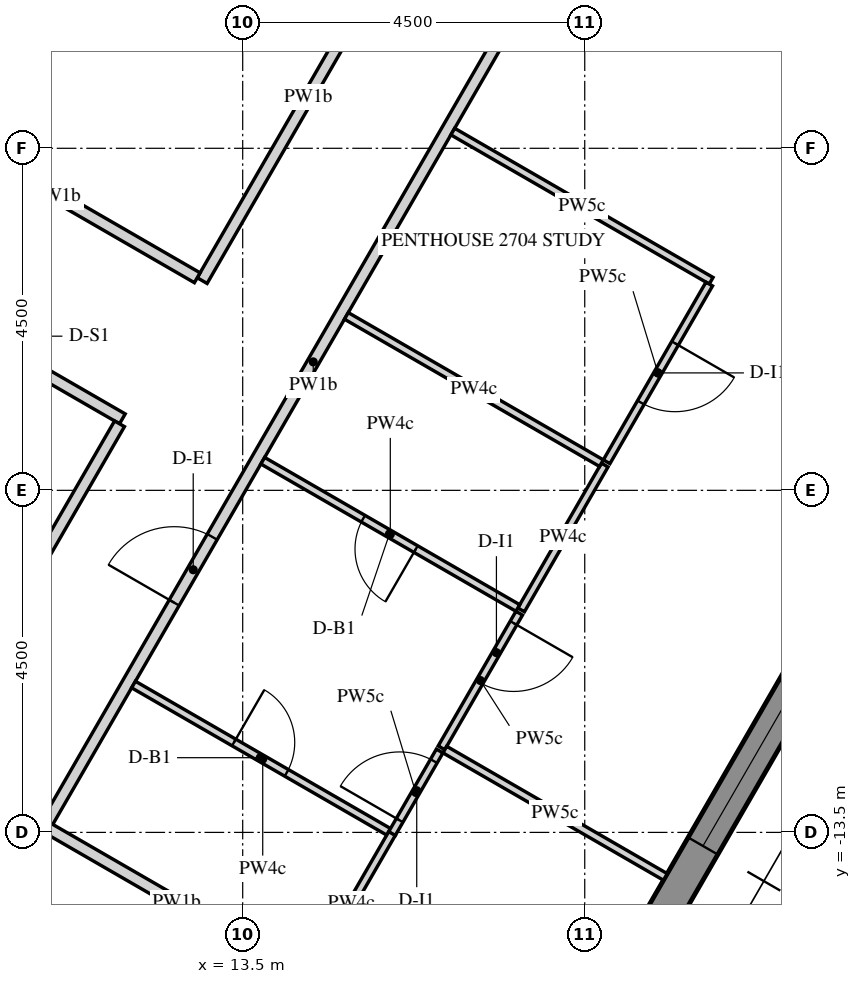
"""IFC4 building model, lengths in metres.
Left out: names, types, materials, properties, quantities, classifications, styles, units other than length and angle.
Written with IfcOpenShell. Run it as: python <this file> out.ifc"""

import sys

from ifc_helpers import new_model, si_unit, direction, frame, frame_2d, origin, place, context, subcontext, project, spatial, polyline, rectangle, outline, extrude, element, fill, save


model = new_model("IFC4")
c1 = context("Model", 3, precision=1e-05, world=origin(), true_north=direction((0.0, 1.0)))
c2 = subcontext(c1, "Body", "Model", "MODEL_VIEW")
j1 = project(units=[si_unit("LENGTHUNIT", "METRE"), si_unit("PLANEANGLEUNIT", "RADIAN")], contexts=[c1])
p1 = place(None, origin())
s1 = spatial("IfcSite", under=j1, at=p1, CompositionType="ELEMENT")
p2 = place(p1, origin())
s2 = spatial("IfcBuilding", under=s1, at=p2, CompositionType="ELEMENT")
p3 = place(p2, frame((0.0, 0.0, 353.4)))
s3 = spatial("IfcBuildingStorey", under=s2, at=p3, CompositionType="ELEMENT", Elevation=353.4)
p4 = place(p3, frame((15.273, -21.097, -0.15), z_axis=(0.0, 0.0, 1.0), x_axis=(0.499997453958, 0.866026873738, 0.0)))
e1 = element("IfcWall", 1, at=p4, inside=s3, PredefinedType="SOLIDWALL", context=c2, shape_type="SweptSolid", body=[
    extrude(outline(polyline([(-0.018, -0.225), (23.152, -0.225), (23.11, 0.225), (0.018, 0.225), (-0.018, -0.225)])), origin(), (0.0, 0.0, 1.0), 3.9),
])
p5 = place(p4, frame((1.366, 0.0, 0.45)))
e2 = element("IfcOpeningElement", 2, at=p5, cuts=e1, PredefinedType="OPENING", context=c2, shape_type="SweptSolid", body=[
    extrude(rectangle(XDim=2.4, YDim=3.0, at=frame_2d((1.2, 1.5))), frame((0.0, 0.235, 0.0), z_axis=(0.0, -1.0, 0.0), x_axis=(1.0, 0.0, 0.0)), (0.0, 0.0, 1.0), 0.47),
])
p6 = place(p4, frame((4.966, 0.0, 0.45)))
e3 = element("IfcOpeningElement", 3, at=p6, cuts=e1, PredefinedType="OPENING", context=c2, shape_type="SweptSolid", body=[
    extrude(rectangle(XDim=2.4, YDim=3.0, at=frame_2d((1.2, 1.5))), frame((0.0, 0.235, 0.0), z_axis=(0.0, -1.0, 0.0), x_axis=(1.0, 0.0, 0.0)), (0.0, 0.0, 1.0), 0.47),
])
p7 = place(p4, frame((8.566, 0.0, 0.45)))
e4 = element("IfcOpeningElement", 4, at=p7, cuts=e1, PredefinedType="OPENING", context=c2, shape_type="SweptSolid", body=[
    extrude(rectangle(XDim=2.4, YDim=3.0, at=frame_2d((1.2, 1.5))), frame((0.0, 0.235, 0.0), z_axis=(0.0, -1.0, 0.0), x_axis=(1.0, 0.0, 0.0)), (0.0, 0.0, 1.0), 0.47),
])
p8 = place(p4, frame((12.166, 0.0, 0.45)))
e5 = element("IfcOpeningElement", 5, at=p8, cuts=e1, PredefinedType="OPENING", context=c2, shape_type="SweptSolid", body=[
    extrude(rectangle(XDim=2.4, YDim=3.0, at=frame_2d((1.2, 1.5))), frame((0.0, 0.235, 0.0), z_axis=(0.0, -1.0, 0.0), x_axis=(1.0, 0.0, 0.0)), (0.0, 0.0, 1.0), 0.47),
])
p9 = place(p4, frame((15.766, 0.0, 0.45)))
e6 = element("IfcOpeningElement", 6, at=p9, cuts=e1, PredefinedType="OPENING", context=c2, shape_type="SweptSolid", body=[
    extrude(rectangle(XDim=2.4, YDim=3.0, at=frame_2d((1.2, 1.5))), frame((0.0, 0.235, 0.0), z_axis=(0.0, -1.0, 0.0), x_axis=(1.0, 0.0, 0.0)), (0.0, 0.0, 1.0), 0.47),
])
p10 = place(p4, frame((19.366, 0.0, 0.45)))
e7 = element("IfcOpeningElement", 7, at=p10, cuts=e1, PredefinedType="OPENING", context=c2, shape_type="SweptSolid", body=[
    extrude(rectangle(XDim=2.4, YDim=3.0, at=frame_2d((1.2, 1.5))), frame((0.0, 0.235, 0.0), z_axis=(0.0, -1.0, 0.0), x_axis=(1.0, 0.0, 0.0)), (0.0, 0.0, 1.0), 0.47),
])
p11 = place(p3, frame((5.673, -9.825, -0.15), z_axis=(0.0, 0.0, 1.0), x_axis=(0.499995046907, 0.866028263435, 0.0)))
e8 = element("IfcWall", 8, at=p11, inside=s3, PredefinedType="SHEAR", context=c2, shape_type="SweptSolid", body=[
    extrude(outline(polyline([(-0.101, -0.175), (11.446, -0.175), (11.244, 0.175), (0.101, 0.175), (-0.101, -0.175)])), origin(), (0.0, 0.0, 1.0), 3.9),
])
p12 = place(p11, frame((4.801, 0.0, 0.15)))
e9 = element("IfcOpeningElement", 9, at=p12, cuts=e8, PredefinedType="OPENING", context=c2, shape_type="SweptSolid", body=[
    extrude(rectangle(XDim=1.8, YDim=2.4, at=frame_2d((0.9, 1.2))), frame((0.0, 0.185, 0.0), z_axis=(0.0, -1.0, 0.0), x_axis=(1.0, 0.0, 0.0)), (0.0, 0.0, 1.0), 0.37),
])
p13 = place(p3, frame((5.773, -10.0, -0.15), z_axis=(0.0, 0.0, 1.0), x_axis=(0.500007911273, -0.866020836161, 0.0)))
e10 = element("IfcWall", 10, at=p13, inside=s3, PredefinedType="SHEAR", context=c2, shape_type="SweptSolid", body=[
    extrude(rectangle(XDim=14.51, YDim=0.35, at=frame_2d((7.255, 0.0))), origin(), (0.0, 0.0, 1.0), 3.9),
])
p14 = place(p13, frame((6.355, 0.0, 0.15)))
e11 = element("IfcOpeningElement", 11, at=p14, cuts=e10, PredefinedType="OPENING", context=c2, shape_type="SweptSolid", body=[
    extrude(rectangle(XDim=1.8, YDim=2.4, at=frame_2d((0.9, 1.2))), frame((0.0, 0.185, 0.0), z_axis=(0.0, -1.0, 0.0), x_axis=(1.0, 0.0, 0.0)), (0.0, 0.0, 1.0), 0.37),
])
p15 = place(p3, frame((10.937, -13.357, 0.0), z_axis=(0.0, 0.0, 1.0), x_axis=(0.499993317597, 0.866029261837, 0.0)))
e12 = element("IfcWall", 12, at=p15, inside=s3, PredefinedType="PARTITIONING", context=c2, shape_type="SweptSolid", body=[
    extrude(rectangle(XDim=13.966, YDim=0.15, at=frame_2d((6.983, 0.0))), origin(), (0.0, 0.0, 1.0), 2.82),
])
p16 = place(p15, frame((3.325, 0.0, 0.0)))
e13 = element("IfcOpeningElement", 13, at=p16, cuts=e12, PredefinedType="OPENING", context=c2, shape_type="SweptSolid", body=[
    extrude(rectangle(XDim=1.0, YDim=2.1, at=frame_2d((0.5, 1.05))), frame((0.0, 0.085, 0.0), z_axis=(0.0, -1.0, 0.0), x_axis=(1.0, 0.0, 0.0)), (0.0, 0.0, 1.0), 0.17),
])
p17 = place(p3, frame((14.363, -15.422, 0.0), z_axis=(0.0, 0.0, 1.0), x_axis=(-0.866026010844, 0.49999894854, 0.0)))
e14 = element("IfcWall", 14, at=p17, inside=s3, PredefinedType="PARTITIONING", context=c2, shape_type="SweptSolid", body=[
    extrude(rectangle(XDim=4.0, YDim=0.15, at=frame_2d((2.0, 0.0))), origin(), (0.0, 0.0, 1.0), 2.82),
])
p18 = place(p3, frame((15.757, -1.409, 0.0), z_axis=(0.0, 0.0, 1.0), x_axis=(-0.500002739321, -0.866023822231, 0.0)))
e15 = element("IfcWall", 15, at=p18, inside=s3, PredefinedType="PARTITIONING", context=c2, shape_type="SweptSolid", body=[
    extrude(rectangle(XDim=5.58, YDim=0.15, at=frame_2d((2.79, 0.0))), origin(), (0.0, 0.0, 1.0), 2.82),
])
p19 = place(p3, frame((12.902, -6.203, 0.0), z_axis=(0.0, 0.0, 1.0), x_axis=(-0.866023907196, 0.500002592159, 0.0)))
e16 = element("IfcWall", 16, at=p19, inside=s3, PredefinedType="PARTITIONING", context=c2, shape_type="SweptSolid", body=[
    extrude(rectangle(XDim=4.275, YDim=0.15, at=frame_2d((2.137, 0.0))), origin(), (0.0, 0.0, 1.0), 2.82),
])
p20 = place(p3, frame((8.15, -5.884, 0.0), z_axis=(0.0, 0.0, 1.0), x_axis=(0.866027639635, -0.499996127374, 0.0)))
e17 = element("IfcWall", 17, at=p20, inside=s3, PredefinedType="PARTITIONING", context=c2, shape_type="SweptSolid", body=[
    extrude(rectangle(XDim=4.35, YDim=0.15, at=frame_2d((2.175, 0.0))), origin(), (0.0, 0.0, 1.0), 2.82),
])
p21 = place(p20, frame((1.725, 0.0, 0.0)))
e18 = element("IfcOpeningElement", 18, at=p21, cuts=e17, PredefinedType="OPENING", context=c2, shape_type="SweptSolid", body=[
    extrude(rectangle(XDim=0.9, YDim=2.1, at=frame_2d((0.45, 1.05))), frame((0.0, 0.085, 0.0), z_axis=(0.0, -1.0, 0.0), x_axis=(1.0, 0.0, 0.0)), (0.0, 0.0, 1.0), 0.17),
])
p22 = place(p3, frame((11.879, -8.124, 0.0), z_axis=(0.0, 0.0, 1.0), x_axis=(-0.500006178143, -0.866021836803, 0.0)))
e19 = element("IfcWall", 19, at=p22, inside=s3, PredefinedType="PARTITIONING", context=c2, shape_type="SweptSolid", body=[
    extrude(rectangle(XDim=4.122, YDim=0.15, at=frame_2d((2.061, 0.0))), origin(), (0.0, 0.0, 1.0), 2.82),
])
p23 = place(p3, frame((17.138, -10.616, 0.0), z_axis=(0.0, 0.0, 1.0), x_axis=(-0.500015134316, -0.866016665807, 0.0)))
e20 = element("IfcWall", 20, at=p23, inside=s3, PredefinedType="PARTITIONING", context=c2, shape_type="SweptSolid", body=[
    extrude(rectangle(XDim=2.046, YDim=0.1, at=frame_2d((1.023, 0.0))), origin(), (0.0, 0.0, 1.0), 2.82),
])
p24 = place(p23, frame((0.15, 0.0, 0.0)))
e21 = element("IfcOpeningElement", 21, at=p24, cuts=e20, PredefinedType="OPENING", context=c2, shape_type="SweptSolid", body=[
    extrude(rectangle(XDim=0.9, YDim=2.1, at=frame_2d((0.45, 1.05))), frame((0.0, 0.06, 0.0), z_axis=(0.0, -1.0, 0.0), x_axis=(1.0, 0.0, 0.0)), (0.0, 0.0, 1.0), 0.12),
])
p25 = place(p3, frame((16.159, -12.411, 0.0), z_axis=(0.0, 0.0, 1.0), x_axis=(0.866032680314, -0.499987396469, 0.0)))
e22 = element("IfcWall", 22, at=p25, inside=s3, PredefinedType="PARTITIONING", context=c2, shape_type="SweptSolid", body=[
    extrude(rectangle(XDim=3.35, YDim=0.1, at=frame_2d((1.675, 0.0))), origin(), (0.0, 0.0, 1.0), 2.82),
])
p26 = place(p3, frame((18.263, -8.667, 0.0), z_axis=(0.0, 0.0, 1.0), x_axis=(-0.50002983664, -0.866008176907, 0.0)))
e23 = element("IfcWall", 23, at=p26, inside=s3, PredefinedType="PARTITIONING", context=c2, shape_type="SweptSolid", body=[
    extrude(rectangle(XDim=2.2, YDim=0.1, at=frame_2d((1.1, 0.0))), origin(), (0.0, 0.0, 1.0), 2.82),
])
p27 = place(p3, frame((16.264, -4.28, 0.0), z_axis=(0.0, 0.0, 1.0), x_axis=(0.866037464623, -0.499979109433, 0.0)))
e24 = element("IfcWall", 24, at=p27, inside=s3, PredefinedType="PARTITIONING", context=c2, shape_type="SweptSolid", body=[
    extrude(rectangle(XDim=3.925, YDim=0.1, at=frame_2d((1.962, 0.0))), origin(), (0.0, 0.0, 1.0), 2.82),
])
p28 = place(p3, frame((19.638, -6.286, 0.0), z_axis=(0.0, 0.0, 1.0), x_axis=(-0.500048589285, -0.86599734893, 0.0)))
e25 = element("IfcWall", 25, at=p28, inside=s3, PredefinedType="PARTITIONING", context=c2, shape_type="SweptSolid", body=[
    extrude(rectangle(XDim=2.7, YDim=0.1, at=frame_2d((1.35, 0.0))), origin(), (0.0, 0.0, 1.0), 2.82),
])
p29 = place(p28, frame((0.9, 0.0, 0.0)))
e26 = element("IfcOpeningElement", 26, at=p29, cuts=e25, PredefinedType="OPENING", context=c2, shape_type="SweptSolid", body=[
    extrude(rectangle(XDim=0.9, YDim=2.1, at=frame_2d((0.45, 1.05))), frame((0.0, 0.06, 0.0), z_axis=(0.0, -1.0, 0.0), x_axis=(1.0, 0.0, 0.0)), (0.0, 0.0, 1.0), 0.12),
])
p30 = place(p3, frame((12.064, -11.555, 0.0), z_axis=(0.0, 0.0, 1.0), x_axis=(0.866037464623, -0.499979109433, 0.0)))
e27 = element("IfcWall", 27, at=p30, inside=s3, PredefinedType="PARTITIONING", context=c2, shape_type="SweptSolid", body=[
    extrude(rectangle(XDim=3.925, YDim=0.1, at=frame_2d((1.962, 0.0))), origin(), (0.0, 0.0, 1.0), 2.82),
])
p31 = place(p30, frame((1.525, 0.0, 0.0)))
e28 = element("IfcOpeningElement", 28, at=p31, cuts=e27, PredefinedType="OPENING", context=c2, shape_type="SweptSolid", body=[
    extrude(rectangle(XDim=0.8, YDim=2.1, at=frame_2d((0.4, 1.05))), frame((0.0, 0.06, 0.0), z_axis=(0.0, -1.0, 0.0), x_axis=(1.0, 0.0, 0.0)), (0.0, 0.0, 1.0), 0.12),
])
p32 = place(p3, frame((15.462, -13.519, 0.0), z_axis=(0.0, 0.0, 1.0), x_axis=(0.50004158446, 0.866001393654, 0.0)))
e29 = element("IfcWall", 29, at=p32, inside=s3, PredefinedType="PARTITIONING", context=c2, shape_type="SweptSolid", body=[
    extrude(rectangle(XDim=1.258, YDim=0.1, at=frame_2d((0.629, 0.0))), origin(), (0.0, 0.0, 1.0), 2.82),
])
p33 = place(p32, frame((0.205, 0.0, 0.0)))
e30 = element("IfcOpeningElement", 30, at=p33, cuts=e29, PredefinedType="OPENING", context=c2, shape_type="SweptSolid", body=[
    extrude(rectangle(XDim=0.9, YDim=2.1, at=frame_2d((0.45, 1.05))), frame((0.0, 0.06, 0.0), z_axis=(0.0, -1.0, 0.0), x_axis=(1.0, 0.0, 0.0)), (0.0, 0.0, 1.0), 0.12),
])
p34 = place(p3, frame((17.12, -10.548, 0.0), z_axis=(0.0, 0.0, 1.0), x_axis=(-0.866032409438, 0.499987865656, 0.0)))
e31 = element("IfcWall", 31, at=p34, inside=s3, PredefinedType="PARTITIONING", context=c2, shape_type="SweptSolid", body=[
    extrude(rectangle(XDim=3.875, YDim=0.1, at=frame_2d((1.938, 0.0))), origin(), (0.0, 0.0, 1.0), 2.82),
])
p35 = place(p34, frame((1.55, 0.0, 0.0)))
e32 = element("IfcOpeningElement", 32, at=p35, cuts=e31, PredefinedType="OPENING", context=c2, shape_type="SweptSolid", body=[
    extrude(rectangle(XDim=0.8, YDim=2.1, at=frame_2d((0.4, 1.05))), frame((0.0, 0.06, 0.0), z_axis=(0.0, -1.0, 0.0), x_axis=(1.0, 0.0, 0.0)), (0.0, 0.0, 1.0), 0.12),
])
p36 = place(p3, frame((14.4, -15.359, 0.0), z_axis=(0.0, 0.0, 1.0), x_axis=(0.499987164874, 0.866032814021, 0.0)))
e33 = element("IfcWall", 33, at=p36, inside=s3, PredefinedType="PARTITIONING", context=c2, shape_type="SweptSolid", body=[
    extrude(rectangle(XDim=2.129, YDim=0.1, at=frame_2d((1.064, 0.0))), origin(), (0.0, 0.0, 1.0), 2.82),
])
p37 = place(p3, frame((18.22, -8.642, 0.0), z_axis=(0.0, 0.0, 1.0), x_axis=(-0.866016658288, 0.500015147339, 0.0)))
e34 = element("IfcWall", 34, at=p37, inside=s3, PredefinedType="PARTITIONING", context=c2, shape_type="SweptSolid", body=[
    extrude(rectangle(XDim=3.875, YDim=0.1, at=frame_2d((1.938, 0.0))), origin(), (0.0, 0.0, 1.0), 2.82),
])
p38 = place(p7, frame((0.0, 0.155, 0.0)))
e35 = element("IfcWindow", 35, at=p38, inside=s3, PartitioningType="DOUBLE_PANEL_VERTICAL", PredefinedType="WINDOW", context=c2, shape_type="SweptSolid", body=[
    extrude(rectangle(XDim=2.4, YDim=3.0, at=frame_2d((1.2, 1.5))), frame((0.0, 0.03, 0.0), z_axis=(0.0, -1.0, 0.0), x_axis=(1.0, 0.0, 0.0)), (0.0, 0.0, 1.0), 0.06),
])
fill(e4, e35)
p39 = place(p16, origin())
e36 = element("IfcDoor", 36, at=p39, inside=s3, OperationType="SINGLE_SWING_LEFT", PredefinedType="DOOR", context=c2, shape_type="SweptSolid", body=[
    extrude(rectangle(XDim=1.0, YDim=2.1, at=frame_2d((0.5, 1.05))), frame((0.0, 0.025, 0.0), z_axis=(0.0, -1.0, 0.0), x_axis=(1.0, 0.0, 0.0)), (0.0, 0.0, 1.0), 0.05),
])
fill(e13, e36)
p40 = place(p31, origin())
e37 = element("IfcDoor", 37, at=p40, inside=s3, OperationType="SINGLE_SWING_RIGHT", PredefinedType="DOOR", context=c2, shape_type="SweptSolid", body=[
    extrude(rectangle(XDim=0.8, YDim=2.1, at=frame_2d((0.4, 1.05))), frame((0.0, 0.025, 0.0), z_axis=(0.0, -1.0, 0.0), x_axis=(1.0, 0.0, 0.0)), (0.0, 0.0, 1.0), 0.05),
])
fill(e28, e37)
p41 = place(p24, origin())
e38 = element("IfcDoor", 38, at=p41, inside=s3, OperationType="SINGLE_SWING_RIGHT", PredefinedType="DOOR", context=c2, shape_type="SweptSolid", body=[
    extrude(rectangle(XDim=0.9, YDim=2.1, at=frame_2d((0.45, 1.05))), frame((0.0, 0.025, 0.0), z_axis=(0.0, -1.0, 0.0), x_axis=(1.0, 0.0, 0.0)), (0.0, 0.0, 1.0), 0.05),
])
fill(e21, e38)
p42 = place(p33, origin())
e39 = element("IfcDoor", 39, at=p42, inside=s3, OperationType="SINGLE_SWING_LEFT", PredefinedType="DOOR", context=c2, shape_type="SweptSolid", body=[
    extrude(rectangle(XDim=0.9, YDim=2.1, at=frame_2d((0.45, 1.05))), frame((0.0, 0.025, 0.0), z_axis=(0.0, -1.0, 0.0), x_axis=(1.0, 0.0, 0.0)), (0.0, 0.0, 1.0), 0.05),
])
fill(e30, e39)
p43 = place(p35, origin())
e40 = element("IfcDoor", 40, at=p43, inside=s3, OperationType="SINGLE_SWING_LEFT", PredefinedType="DOOR", context=c2, shape_type="SweptSolid", body=[
    extrude(rectangle(XDim=0.8, YDim=2.1, at=frame_2d((0.4, 1.05))), frame((0.0, 0.025, 0.0), z_axis=(0.0, -1.0, 0.0), x_axis=(1.0, 0.0, 0.0)), (0.0, 0.0, 1.0), 0.05),
])
fill(e32, e40)
p44 = place(p29, origin())
e41 = element("IfcDoor", 41, at=p44, inside=s3, OperationType="SINGLE_SWING_LEFT", PredefinedType="DOOR", context=c2, shape_type="SweptSolid", body=[
    extrude(rectangle(XDim=0.9, YDim=2.1, at=frame_2d((0.45, 1.05))), frame((0.0, 0.025, 0.0), z_axis=(0.0, -1.0, 0.0), x_axis=(1.0, 0.0, 0.0)), (0.0, 0.0, 1.0), 0.05),
])
fill(e26, e41)
save(model, sys.argv[1])
